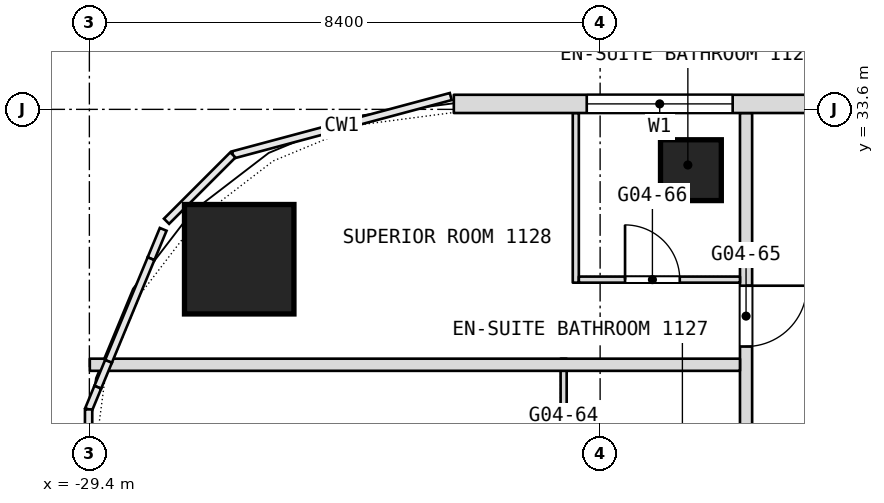
"""IFC4 building model, lengths in metres.
Left out: names, types, materials, properties, quantities, classifications, styles, units other than length and angle.
Written with IfcOpenShell. Run it as: python <this file> out.ifc"""

import sys

from ifc_helpers import new_model, si_unit, direction, frame, frame_2d, origin, origin_2d, place, context, subcontext, project, spatial, rectangle, extrude, element, fill, save


model = new_model("IFC4")
c1 = context("Model", 3, precision=1e-05, world=origin(), true_north=direction((0.0, 1.0)))
c2 = subcontext(c1, "Body", "Model", "MODEL_VIEW")
j1 = project(units=[si_unit("LENGTHUNIT", "METRE"), si_unit("PLANEANGLEUNIT", "RADIAN")], contexts=[c1])
p1 = place(None, origin())
s1 = spatial("IfcSite", under=j1, at=p1, CompositionType="ELEMENT")
p2 = place(p1, origin())
s2 = spatial("IfcBuilding", under=s1, at=p2, CompositionType="ELEMENT")
p3 = place(p2, frame((0.0, 0.0, 54.5)))
s3 = spatial("IfcBuildingStorey", under=s2, at=p3, CompositionType="ELEMENT", Elevation=54.5)
p4 = place(p3, frame((-26.936, 31.135, 0.0), z_axis=(0.0, 0.0, 1.0), x_axis=(1.0, 0.0, 0.0)))
e1 = element("IfcColumn", 1, at=p4, inside=s3, PredefinedType="COLUMN", context=c2, shape_type="SweptSolid", body=[
    extrude(rectangle(XDim=1.8, YDim=1.8, at=origin_2d()), origin(), (0.0, 0.0, 1.0), 3.6),
])
p5 = place(p3, frame((-19.507, 32.6, 0.0), z_axis=(0.0, 0.0, 1.0), x_axis=(1.0, 0.0, 0.0)))
e2 = element("IfcColumn", 2, at=p5, inside=s3, PredefinedType="COLUMN", context=c2, shape_type="SweptSolid", body=[
    extrude(rectangle(XDim=1.0, YDim=1.0, at=origin_2d()), origin(), (0.0, 0.0, 1.0), 3.6),
])
p6 = place(p3, frame((-18.6, 18.5, 0.0), z_axis=(0.0, 0.0, 1.0), x_axis=(0.0, 1.0, 0.0)))
e3 = element("IfcWall", 3, at=p6, inside=s3, PredefinedType="PARTITIONING", context=c2, shape_type="SweptSolid", body=[
    extrude(rectangle(XDim=15.04, YDim=0.2, at=frame_2d((7.52, 0.0))), origin(), (0.0, 0.0, 1.0), 3.34),
])
p7 = place(p6, frame((2.9, 0.0, 0.0)))
e4 = element("IfcOpeningElement", 4, at=p7, cuts=e3, PredefinedType="OPENING", context=c2, shape_type="SweptSolid", body=[
    extrude(rectangle(XDim=1.0, YDim=2.1, at=frame_2d((0.5, 1.05))), frame((0.0, 0.1, 0.0), z_axis=(0.0, -1.0, 0.0), x_axis=(1.0, 0.0, 0.0)), (0.0, 0.0, 1.0), 0.2),
])
p8 = place(p6, frame((7.1, 0.0, 0.0)))
e5 = element("IfcOpeningElement", 5, at=p8, cuts=e3, PredefinedType="OPENING", context=c2, shape_type="SweptSolid", body=[
    extrude(rectangle(XDim=1.0, YDim=2.1, at=frame_2d((0.5, 1.05))), frame((0.0, 0.1, 0.0), z_axis=(0.0, -1.0, 0.0), x_axis=(1.0, 0.0, 0.0)), (0.0, 0.0, 1.0), 0.2),
])
p9 = place(p6, frame((11.2, 0.0, 0.0)))
e6 = element("IfcOpeningElement", 6, at=p9, cuts=e3, PredefinedType="OPENING", context=c2, shape_type="SweptSolid", body=[
    extrude(rectangle(XDim=1.0, YDim=2.1, at=frame_2d((0.5, 1.05))), frame((0.0, 0.1, 0.0), z_axis=(0.0, -1.0, 0.0), x_axis=(1.0, 0.0, 0.0)), (0.0, 0.0, 1.0), 0.2),
])
p10 = place(p3, frame((-21.4, 30.75, 0.0), z_axis=(0.0, 0.0, 1.0), x_axis=(0.0, 1.0, 0.0)))
e7 = element("IfcWall", 7, at=p10, inside=s3, PredefinedType="PARTITIONING", context=c2, shape_type="SweptSolid", body=[
    extrude(rectangle(XDim=2.79, YDim=0.1, at=frame_2d((1.395, 0.0))), origin(), (0.0, 0.0, 1.0), 3.34),
])
p11 = place(p3, frame((-21.6, 26.95, 0.0), z_axis=(0.0, 0.0, 1.0), x_axis=(0.0, 1.0, 0.0)))
e8 = element("IfcWall", 8, at=p11, inside=s3, PredefinedType="PARTITIONING", context=c2, shape_type="SweptSolid", body=[
    extrude(rectangle(XDim=2.55, YDim=0.1, at=frame_2d((1.275, 0.0))), origin(), (0.0, 0.0, 1.0), 3.34),
])
p12 = place(p11, frame((0.15, 0.0, 0.0)))
e9 = element("IfcOpeningElement", 9, at=p12, cuts=e8, PredefinedType="OPENING", context=c2, shape_type="SweptSolid", body=[
    extrude(rectangle(XDim=0.9, YDim=2.1, at=frame_2d((0.45, 1.05))), frame((0.0, 0.05, 0.0), z_axis=(0.0, -1.0, 0.0), x_axis=(1.0, 0.0, 0.0)), (0.0, 0.0, 1.0), 0.1),
])
p13 = place(p3, frame((-29.393, 29.4, 0.0), z_axis=(0.0, 0.0, 1.0), x_axis=(1.0, 0.0, 0.0)))
e10 = element("IfcWall", 10, at=p13, inside=s3, PredefinedType="PARTITIONING", context=c2, shape_type="SweptSolid", body=[
    extrude(rectangle(XDim=10.693, YDim=0.2, at=frame_2d((5.347, 0.0))), origin(), (0.0, 0.0, 1.0), 3.34),
])
p14 = place(p3, frame((-21.35, 30.8, 0.0), z_axis=(0.0, 0.0, 1.0), x_axis=(1.0, 0.0, 0.0)))
e11 = element("IfcWall", 11, at=p14, inside=s3, PredefinedType="PARTITIONING", context=c2, shape_type="SweptSolid", body=[
    extrude(rectangle(XDim=2.65, YDim=0.1, at=frame_2d((1.325, 0.0))), origin(), (0.0, 0.0, 1.0), 3.34),
])
p15 = place(p14, frame((0.76, 0.0, 0.0)))
e12 = element("IfcOpeningElement", 12, at=p15, cuts=e11, PredefinedType="OPENING", context=c2, shape_type="SweptSolid", body=[
    extrude(rectangle(XDim=0.9, YDim=2.1, at=frame_2d((0.45, 1.05))), frame((0.0, 0.05, 0.0), z_axis=(0.0, -1.0, 0.0), x_axis=(1.0, 0.0, 0.0)), (0.0, 0.0, 1.0), 0.1),
])
p16 = place(p3, frame((23.406, 33.69, 0.0), z_axis=(0.0, 0.0, 1.0), x_axis=(-1.0, 0.0, 0.0)))
e13 = element("IfcWall", 13, at=p16, inside=s3, PredefinedType="NOTDEFINED", context=c2, shape_type="SweptSolid", body=[
    extrude(rectangle(XDim=46.812, YDim=0.3, at=frame_2d((23.406, 0.0))), origin(), (0.0, 0.0, 1.0), 3.6),
])
p17 = place(p16, frame((2.186, 0.0, 0.9)))
e14 = element("IfcOpeningElement", 14, at=p17, cuts=e13, PredefinedType="OPENING", context=c2, shape_type="SweptSolid", body=[
    extrude(rectangle(XDim=2.4, YDim=2.1, at=frame_2d((1.2, 1.05))), frame((0.0, 0.15, 0.0), z_axis=(0.0, -1.0, 0.0), x_axis=(1.0, 0.0, 0.0)), (0.0, 0.0, 1.0), 0.3),
])
p18 = place(p16, frame((7.506, 0.0, 0.9)))
e15 = element("IfcOpeningElement", 15, at=p18, cuts=e13, PredefinedType="OPENING", context=c2, shape_type="SweptSolid", body=[
    extrude(rectangle(XDim=2.4, YDim=2.1, at=frame_2d((1.2, 1.05))), frame((0.0, 0.15, 0.0), z_axis=(0.0, -1.0, 0.0), x_axis=(1.0, 0.0, 0.0)), (0.0, 0.0, 1.0), 0.3),
])
p19 = place(p16, frame((11.706, 0.0, 0.9)))
e16 = element("IfcOpeningElement", 16, at=p19, cuts=e13, PredefinedType="OPENING", context=c2, shape_type="SweptSolid", body=[
    extrude(rectangle(XDim=2.4, YDim=2.1, at=frame_2d((1.2, 1.05))), frame((0.0, 0.15, 0.0), z_axis=(0.0, -1.0, 0.0), x_axis=(1.0, 0.0, 0.0)), (0.0, 0.0, 1.0), 0.3),
])
p20 = place(p16, frame((15.906, 0.0, 0.9)))
e17 = element("IfcOpeningElement", 17, at=p20, cuts=e13, PredefinedType="OPENING", context=c2, shape_type="SweptSolid", body=[
    extrude(rectangle(XDim=2.4, YDim=2.1, at=frame_2d((1.2, 1.05))), frame((0.0, 0.15, 0.0), z_axis=(0.0, -1.0, 0.0), x_axis=(1.0, 0.0, 0.0)), (0.0, 0.0, 1.0), 0.3),
])
p21 = place(p16, frame((20.106, 0.0, 0.9)))
e18 = element("IfcOpeningElement", 18, at=p21, cuts=e13, PredefinedType="OPENING", context=c2, shape_type="SweptSolid", body=[
    extrude(rectangle(XDim=2.4, YDim=2.1, at=frame_2d((1.2, 1.05))), frame((0.0, 0.15, 0.0), z_axis=(0.0, -1.0, 0.0), x_axis=(1.0, 0.0, 0.0)), (0.0, 0.0, 1.0), 0.3),
])
p22 = place(p16, frame((24.306, 0.0, 0.9)))
e19 = element("IfcOpeningElement", 19, at=p22, cuts=e13, PredefinedType="OPENING", context=c2, shape_type="SweptSolid", body=[
    extrude(rectangle(XDim=2.4, YDim=2.1, at=frame_2d((1.2, 1.05))), frame((0.0, 0.15, 0.0), z_axis=(0.0, -1.0, 0.0), x_axis=(1.0, 0.0, 0.0)), (0.0, 0.0, 1.0), 0.3),
])
p23 = place(p16, frame((28.506, 0.0, 0.9)))
e20 = element("IfcOpeningElement", 20, at=p23, cuts=e13, PredefinedType="OPENING", context=c2, shape_type="SweptSolid", body=[
    extrude(rectangle(XDim=2.4, YDim=2.1, at=frame_2d((1.2, 1.05))), frame((0.0, 0.15, 0.0), z_axis=(0.0, -1.0, 0.0), x_axis=(1.0, 0.0, 0.0)), (0.0, 0.0, 1.0), 0.3),
])
p24 = place(p16, frame((32.706, 0.0, 0.9)))
e21 = element("IfcOpeningElement", 21, at=p24, cuts=e13, PredefinedType="OPENING", context=c2, shape_type="SweptSolid", body=[
    extrude(rectangle(XDim=2.4, YDim=2.1, at=frame_2d((1.2, 1.05))), frame((0.0, 0.15, 0.0), z_axis=(0.0, -1.0, 0.0), x_axis=(1.0, 0.0, 0.0)), (0.0, 0.0, 1.0), 0.3),
])
p25 = place(p16, frame((36.906, 0.0, 0.9)))
e22 = element("IfcOpeningElement", 22, at=p25, cuts=e13, PredefinedType="OPENING", context=c2, shape_type="SweptSolid", body=[
    extrude(rectangle(XDim=2.4, YDim=2.1, at=frame_2d((1.2, 1.05))), frame((0.0, 0.15, 0.0), z_axis=(0.0, -1.0, 0.0), x_axis=(1.0, 0.0, 0.0)), (0.0, 0.0, 1.0), 0.3),
])
p26 = place(p16, frame((42.226, 0.0, 0.9)))
e23 = element("IfcOpeningElement", 23, at=p26, cuts=e13, PredefinedType="OPENING", context=c2, shape_type="SweptSolid", body=[
    extrude(rectangle(XDim=2.4, YDim=2.1, at=frame_2d((1.2, 1.05))), frame((0.0, 0.15, 0.0), z_axis=(0.0, -1.0, 0.0), x_axis=(1.0, 0.0, 0.0)), (0.0, 0.0, 1.0), 0.3),
])
p27 = place(p9, origin())
e24 = element("IfcDoor", 24, at=p27, inside=s3, OperationType="SINGLE_SWING_RIGHT", PredefinedType="DOOR", context=c2, shape_type="SweptSolid", body=[
    extrude(rectangle(XDim=1.0, YDim=2.1, at=frame_2d((0.5, 1.05))), frame((0.0, 0.025, 0.0), z_axis=(0.0, -1.0, 0.0), x_axis=(1.0, 0.0, 0.0)), (0.0, 0.0, 1.0), 0.05),
])
fill(e6, e24)
p28 = place(p15, origin())
e25 = element("IfcDoor", 25, at=p28, inside=s3, OperationType="SINGLE_SWING_LEFT", PredefinedType="DOOR", context=c2, shape_type="SweptSolid", body=[
    extrude(rectangle(XDim=0.9, YDim=2.1, at=frame_2d((0.45, 1.05))), frame((0.0, 0.025, 0.0), z_axis=(0.0, -1.0, 0.0), x_axis=(1.0, 0.0, 0.0)), (0.0, 0.0, 1.0), 0.05),
])
fill(e12, e25)
p29 = place(p26, origin())
e26 = element("IfcWindow", 26, at=p29, inside=s3, PartitioningType="SINGLE_PANEL", PredefinedType="WINDOW", context=c2, shape_type="SweptSolid", body=[
    extrude(rectangle(XDim=2.4, YDim=2.1, at=frame_2d((1.2, 1.05))), frame((0.0, 0.03, 0.0), z_axis=(0.0, -1.0, 0.0), x_axis=(1.0, 0.0, 0.0)), (0.0, 0.0, 1.0), 0.06),
])
fill(e23, e26)
save(model, sys.argv[1])
